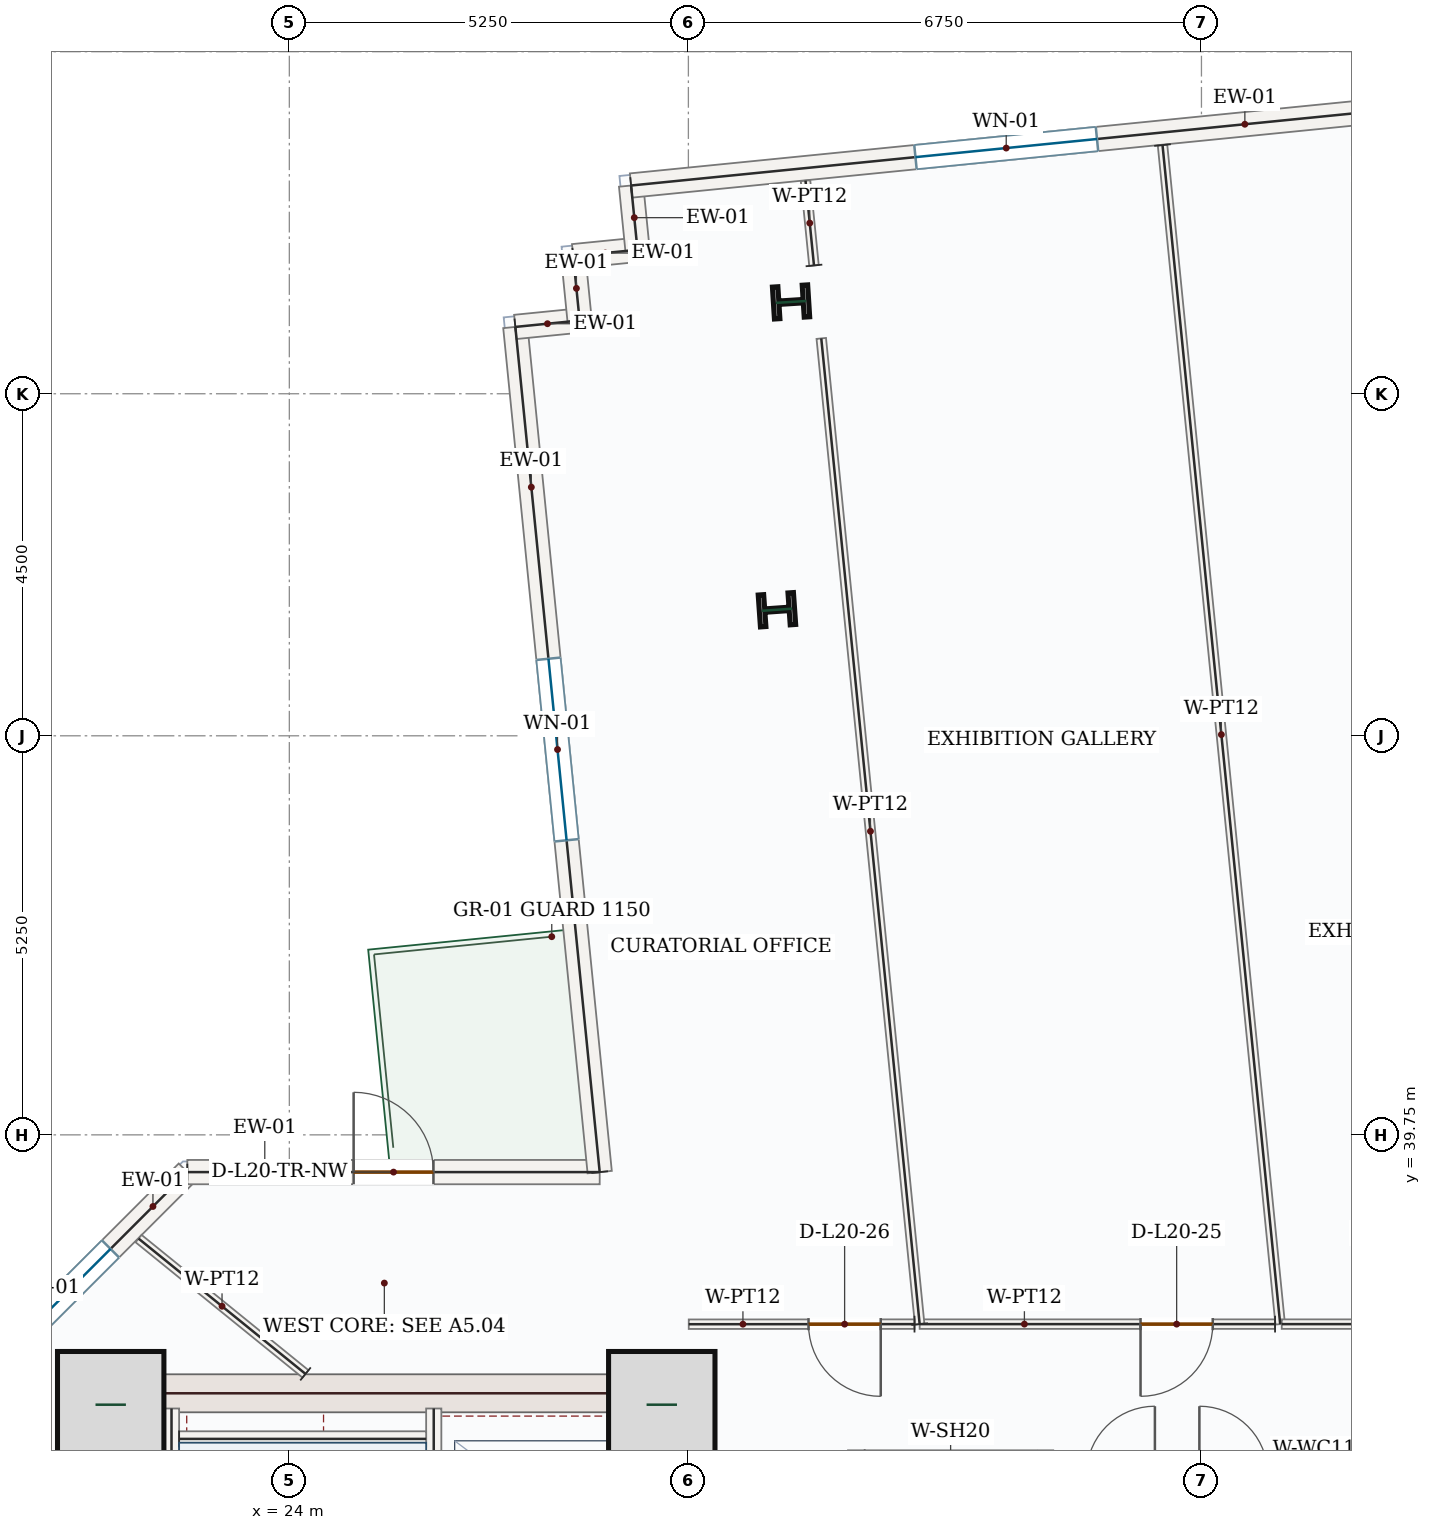
"""IFC4 building model, lengths in metres.
Left out: names, types, materials, properties, quantities, classifications, styles, units other than length and angle.
Written with IfcOpenShell. Run it as: python <this file> out.ifc"""

import sys

from ifc_helpers import new_model, si_unit, direction, frame, frame_2d, origin, origin_2d, place, context, subcontext, project, spatial, rectangle, i_section, extrude, source, transform, mapped, element, fill, save


model = new_model("IFC4")
c1 = context("Model", 3, precision=1e-05, world=origin(), true_north=direction((0.0, 1.0)))
c2 = subcontext(c1, "Body", "Model", "MODEL_VIEW")
j1 = project(units=[si_unit("LENGTHUNIT", "METRE"), si_unit("PLANEANGLEUNIT", "RADIAN")], contexts=[c1])
p1 = place(None, origin())
s1 = spatial("IfcSite", under=j1, at=p1, CompositionType="ELEMENT")
p2 = place(p1, origin())
s2 = spatial("IfcBuilding", under=s1, at=p2, CompositionType="ELEMENT")
p3 = place(p2, frame((0.0, 0.0, 92.1)))
s3 = spatial("IfcBuildingStorey", under=s2, at=p3, CompositionType="ELEMENT", Elevation=92.1)
m1 = source(origin(), c2, "Body", "SweptSolid", [
    extrude(rectangle(XDim=8.55, YDim=0.5, at=frame_2d((4.275, 0.0))), origin(), (0.0, 0.0, 1.0), 3.95),
])
p4 = place(p3, frame((21.5, 28.05, 0.0), z_axis=(0.0, 0.0, 1.0), x_axis=(0.0, 1.0, 0.0)))
e1 = element("IfcWall", 1, at=p4, inside=s3, PredefinedType="SHEAR", context=c2, shape_type="MappedRepresentation", body=[
    mapped(m1, transform((0.0, 0.0, 0.0), x_axis=(1.0, 0.0, 0.0), y_axis=(0.0, 1.0, 0.0), z_axis=(0.0, 0.0, 1.0), scale=1.0)),
])
p5 = place(p3, frame((29.0, 28.05, 0.0), z_axis=(0.0, 0.0, 1.0), x_axis=(0.0, 1.0, 0.0)))
e2 = element("IfcWall", 2, at=p5, inside=s3, PredefinedType="SHEAR", context=c2, shape_type="SweptSolid", body=[
    extrude(rectangle(XDim=8.55, YDim=0.5, at=frame_2d((4.275, 0.0))), origin(), (0.0, 0.0, 1.0), 3.95),
])
p6 = place(p5, frame((1.5, 0.0, 0.0)))
e3 = element("IfcOpeningElement", 3, at=p6, cuts=e2, PredefinedType="OPENING", context=c2, shape_type="SweptSolid", body=[
    extrude(rectangle(XDim=1.1, YDim=2.2, at=frame_2d((0.55, 1.1))), frame((0.0, 0.26, 0.0), z_axis=(0.0, -1.0, 0.0), x_axis=(1.0, 0.0, 0.0)), (0.0, 0.0, 1.0), 0.52),
])
m2 = source(origin(), c2, "Body", "SweptSolid", [
    extrude(rectangle(XDim=7.0, YDim=0.5, at=frame_2d((3.5, 0.0))), origin(), (0.0, 0.0, 1.0), 3.95),
])
p7 = place(p3, frame((21.75, 36.35, 0.0), z_axis=(0.0, 0.0, 1.0), x_axis=(1.0, 0.0, 0.0)))
e4 = element("IfcWall", 4, at=p7, inside=s3, PredefinedType="SHEAR", context=c2, shape_type="MappedRepresentation", body=[
    mapped(m2, transform((0.0, 0.0, 0.0), x_axis=(1.0, 0.0, 0.0), y_axis=(0.0, 1.0, 0.0), z_axis=(0.0, 0.0, 1.0), scale=1.0)),
])
m3 = source(origin(), c2, "Body", "SweptSolid", [
    extrude(rectangle(XDim=1.4, YDim=1.4, at=origin_2d()), origin(), (0.0, 0.0, 1.0), 4.2),
])
for number, where, z_axis, x_axis in (
    (5, (21.65, 36.2, 0.0), (0.0, 0.0, 1.0), (1.0, 0.0, 0.0)),
    (6, (28.9, 36.2, 0.0), (0.0, 0.0, 1.0), (1.0, 0.0, 0.0)),
):
    element("IfcColumn", number, at=place(p3, frame(where, z_axis=z_axis, x_axis=x_axis)), inside=s3, PredefinedType="COLUMN", context=c2, shape_type="MappedRepresentation", body=[
        mapped(m3, transform((0.0, 0.0, 0.0), x_axis=(1.0, 0.0, 0.0), y_axis=(0.0, 1.0, 0.0), z_axis=(0.0, 0.0, 1.0), scale=1.0)),
    ])
m4 = source(origin(), c2, "Body", "SweptSolid", [
    extrude(i_section(OverallWidth=0.421, OverallDepth=0.465, WebThickness=0.045, FlangeThickness=0.073, FilletRadius=0.018, at=origin_2d()), origin(), (0.0, 0.0, 1.0), 4.2),
])
for number, where, z_axis, x_axis in (
    (7, (30.415, 46.658, 0.0), (0.0, 0.0, 1.0), (-0.07, 0.998, 0.0)),
    (8, (30.601, 50.708, 0.0), (0.0, 0.0, 1.0), (-0.063, 0.998, 0.0)),
):
    element("IfcColumn", number, at=place(p3, frame(where, z_axis=z_axis, x_axis=x_axis)), inside=s3, PredefinedType="COLUMN", context=c2, shape_type="MappedRepresentation", body=[
        mapped(m4, transform((0.0, 0.0, 0.0), x_axis=(1.0, 0.0, 0.0), y_axis=(0.0, 1.0, 0.0), z_axis=(0.0, 0.0, 1.0), scale=1.0)),
    ])
p8 = place(p3, frame((18.94, 35.542, 0.0), z_axis=(0.0, 0.0, 1.0), x_axis=(0.707106781187, 0.707106781187, 0.0)))
e9 = element("IfcWall", 9, at=p8, inside=s3, PredefinedType="SOLIDWALL", context=c2, shape_type="SweptSolid", body=[
    extrude(rectangle(XDim=5.258, YDim=0.32, at=frame_2d((2.629, 0.0))), origin(), (0.0, 0.0, 1.0), 3.95),
])
p9 = place(p8, frame((1.429, 0.0, 0.85)))
e10 = element("IfcOpeningElement", 10, at=p9, cuts=e9, PredefinedType="OPENING", context=c2, shape_type="SweptSolid", body=[
    extrude(rectangle(XDim=2.4, YDim=1.8, at=frame_2d((1.2, 0.9))), frame((0.0, 0.17, 0.0), z_axis=(0.0, -1.0, 0.0), x_axis=(1.0, 0.0, 0.0)), (0.0, 0.0, 1.0), 0.34),
])
p10 = place(p3, frame((22.658, 39.26, 0.0), z_axis=(0.0, 0.0, 1.0), x_axis=(1.0, 0.0, 0.0)))
e11 = element("IfcWall", 11, at=p10, inside=s3, PredefinedType="SOLIDWALL", context=c2, shape_type="SweptSolid", body=[
    extrude(rectangle(XDim=5.425, YDim=0.32, at=frame_2d((2.713, 0.0))), origin(), (0.0, 0.0, 1.0), 3.95),
])
p11 = place(p10, frame((2.188, 0.0, 0.0)))
e12 = element("IfcOpeningElement", 12, at=p11, cuts=e11, PredefinedType="OPENING", context=c2, shape_type="SweptSolid", body=[
    extrude(rectangle(XDim=1.05, YDim=2.15, at=frame_2d((0.525, 1.075))), frame((0.0, 0.17, 0.0), z_axis=(0.0, -1.0, 0.0), x_axis=(1.0, 0.0, 0.0)), (0.0, 0.0, 1.0), 0.34),
])
p12 = place(p3, frame((28.083, 39.26, 0.0), z_axis=(0.0, 0.0, 1.0), x_axis=(-0.099322009391, 0.995055344416, 0.0)))
e13 = element("IfcWall", 13, at=p12, inside=s3, PredefinedType="SOLIDWALL", context=c2, shape_type="SweptSolid", body=[
    extrude(rectangle(XDim=11.174, YDim=0.32, at=frame_2d((5.587, 0.0))), origin(), (0.0, 0.0, 1.0), 3.95),
])
p13 = place(p12, frame((4.387, 0.0, 0.85)))
e14 = element("IfcOpeningElement", 14, at=p13, cuts=e13, PredefinedType="OPENING", context=c2, shape_type="SweptSolid", body=[
    extrude(rectangle(XDim=2.4, YDim=1.8, at=frame_2d((1.2, 0.9))), frame((0.0, 0.17, 0.0), z_axis=(0.0, -1.0, 0.0), x_axis=(1.0, 0.0, 0.0)), (0.0, 0.0, 1.0), 0.34),
])
m5 = source(origin(), c2, "Body", "SweptSolid", [
    extrude(rectangle(XDim=0.85, YDim=0.32, at=frame_2d((0.425, 0.0))), origin(), (0.0, 0.0, 1.0), 3.95),
])
p14 = place(p3, frame((26.973, 50.379, 0.0), z_axis=(0.0, 0.0, 1.0), x_axis=(0.995076929088, 0.099105525559, 0.0)))
e15 = element("IfcWall", 15, at=p14, inside=s3, PredefinedType="SOLIDWALL", context=c2, shape_type="MappedRepresentation", body=[
    mapped(m5, transform((0.0, 0.0, 0.0), x_axis=(1.0, 0.0, 0.0), y_axis=(0.0, 1.0, 0.0), z_axis=(0.0, 0.0, 1.0), scale=1.0)),
])
m6 = source(origin(), c2, "Body", "SweptSolid", [
    extrude(rectangle(XDim=0.85, YDim=0.32, at=frame_2d((0.425, 0.0))), origin(), (0.0, 0.0, 1.0), 3.95),
])
for number, where, z_axis, x_axis in (
    (16, (27.819, 50.463, 0.0), (0.0, 0.0, 1.0), (-0.099, 0.995, 0.0)),
    (17, (27.735, 51.309, 0.0), (0.0, 0.0, 1.0), (0.995, 0.099, 0.0)),
):
    element("IfcWall", number, at=place(p3, frame(where, z_axis=z_axis, x_axis=x_axis)), inside=s3, PredefinedType="SOLIDWALL", context=c2, shape_type="MappedRepresentation", body=[
        mapped(m6, transform((0.0, 0.0, 0.0), x_axis=(1.0, 0.0, 0.0), y_axis=(0.0, 1.0, 0.0), z_axis=(0.0, 0.0, 1.0), scale=1.0)),
    ])
p15 = place(p3, frame((28.581, 51.394, 0.0), z_axis=(0.0, 0.0, 1.0), x_axis=(-0.09938995433, 0.995048560111, 0.0)))
e18 = element("IfcWall", 18, at=p15, inside=s3, PredefinedType="SOLIDWALL", context=c2, shape_type="MappedRepresentation", body=[
    mapped(m5, transform((0.0, 0.0, 0.0), x_axis=(1.0, 0.0, 0.0), y_axis=(0.0, 1.0, 0.0), z_axis=(0.0, 0.0, 1.0), scale=1.0)),
])
p16 = place(p3, frame((28.496, 52.24, 0.0), z_axis=(0.0, 0.0, 1.0), x_axis=(0.995054718915, 0.09932827576, 0.0)))
e19 = element("IfcWall", 19, at=p16, inside=s3, PredefinedType="SOLIDWALL", context=c2, shape_type="SweptSolid", body=[
    extrude(rectangle(XDim=9.92, YDim=0.32, at=frame_2d((4.96, 0.0))), origin(), (0.0, 0.0, 1.0), 3.95),
])
p17 = place(p16, frame((3.76, 0.0, 0.85)))
e20 = element("IfcOpeningElement", 20, at=p17, cuts=e19, PredefinedType="OPENING", context=c2, shape_type="SweptSolid", body=[
    extrude(rectangle(XDim=2.4, YDim=1.8, at=frame_2d((1.2, 0.9))), frame((0.0, 0.17, 0.0), z_axis=(0.0, -1.0, 0.0), x_axis=(1.0, 0.0, 0.0)), (0.0, 0.0, 1.0), 0.34),
])
m7 = source(origin(), c2, "Body", "SweptSolid", [
    extrude(rectangle(XDim=7.87, YDim=0.2, at=frame_2d((3.935, 0.0))), origin(), (0.0, 0.0, 1.0), 3.95),
])
p18 = place(p3, frame((22.45, 28.28, 0.0), z_axis=(0.0, 0.0, 1.0), x_axis=(0.0, 1.0, 0.0)))
e21 = element("IfcWall", 21, at=p18, inside=s3, PredefinedType="SOLIDWALL", context=c2, shape_type="MappedRepresentation", body=[
    mapped(m7, transform((0.0, 0.0, 0.0), x_axis=(1.0, 0.0, 0.0), y_axis=(0.0, 1.0, 0.0), z_axis=(0.0, 0.0, 1.0), scale=1.0)),
])
p19 = place(p3, frame((25.9, 28.15, 0.0), z_axis=(0.0, 0.0, 1.0), x_axis=(0.0, 1.0, 0.0)))
e22 = element("IfcWall", 22, at=p19, inside=s3, PredefinedType="SOLIDWALL", context=c2, shape_type="SweptSolid", body=[
    extrude(rectangle(XDim=8.0, YDim=0.2, at=frame_2d((4.0, 0.0))), origin(), (0.0, 0.0, 1.0), 3.95),
])
p20 = place(p19, frame((0.4, 0.0, 0.0)))
e23 = element("IfcOpeningElement", 23, at=p20, cuts=e22, PredefinedType="OPENING", context=c2, shape_type="SweptSolid", body=[
    extrude(rectangle(XDim=1.05, YDim=2.15, at=frame_2d((0.525, 1.075))), frame((0.0, 0.11, 0.0), z_axis=(0.0, -1.0, 0.0), x_axis=(1.0, 0.0, 0.0)), (0.0, 0.0, 1.0), 0.22),
])
m8 = source(origin(), c2, "Body", "SweptSolid", [
    extrude(rectangle(XDim=3.25, YDim=0.2, at=frame_2d((1.625, 0.0))), origin(), (0.0, 0.0, 1.0), 3.95),
])
p21 = place(p3, frame((22.55, 35.75, 0.0), z_axis=(0.0, 0.0, 1.0), x_axis=(1.0, 0.0, 0.0)))
e24 = element("IfcWall", 24, at=p21, inside=s3, PredefinedType="SOLIDWALL", context=c2, shape_type="MappedRepresentation", body=[
    mapped(m8, transform((0.0, 0.0, 0.0), x_axis=(1.0, 0.0, 0.0), y_axis=(0.0, 1.0, 0.0), z_axis=(0.0, 0.0, 1.0), scale=1.0)),
])
m9 = source(origin(), c2, "Body", "SweptSolid", [
    extrude(rectangle(XDim=2.4, YDim=0.2, at=frame_2d((1.2, 0.0))), origin(), (0.0, 0.0, 1.0), 3.95),
])
for number, where, z_axis, x_axis in (
    (25, (31.45, 33.2, 0.0), (0.0, 0.0, 1.0), (0.0, 1.0, 0.0)),
    (26, (33.95, 33.2, 0.0), (0.0, 0.0, 1.0), (0.0, 1.0, 0.0)),
    (27, (38.05, 33.2, 0.0), (0.0, 0.0, 1.0), (0.0, 1.0, 0.0)),
):
    element("IfcWall", number, at=place(p3, frame(where, z_axis=z_axis, x_axis=x_axis)), inside=s3, PredefinedType="SOLIDWALL", context=c2, shape_type="MappedRepresentation", body=[
        mapped(m9, transform((0.0, 0.0, 0.0), x_axis=(1.0, 0.0, 0.0), y_axis=(0.0, 1.0, 0.0), z_axis=(0.0, 0.0, 1.0), scale=1.0)),
    ])
m10 = source(origin(), c2, "Body", "SweptSolid", [
    extrude(rectangle(XDim=15.589, YDim=0.125, at=frame_2d((7.794, 0.0))), origin(), (0.0, 0.0, 1.0), 3.95),
])
p22 = place(p3, frame((35.488, 52.771, 0.0), z_axis=(0.0, 0.0, 1.0), x_axis=(0.099325393126, -0.995055006661, 0.0)))
e28 = element("IfcWall", 28, at=p22, inside=s3, PredefinedType="PARTITIONING", context=c2, shape_type="MappedRepresentation", body=[
    mapped(m10, transform((0.0, 0.0, 0.0), x_axis=(1.0, 0.0, 0.0), y_axis=(0.0, 1.0, 0.0), z_axis=(0.0, 0.0, 1.0), scale=1.0)),
])
p23 = place(p3, frame((36.968, 37.26, 0.0), z_axis=(0.0, 0.0, 1.0), x_axis=(-1.0, 0.0, 0.0)))
e29 = element("IfcWall", 29, at=p23, inside=s3, PredefinedType="PARTITIONING", context=c2, shape_type="SweptSolid", body=[
    extrude(rectangle(XDim=4.676, YDim=0.125, at=frame_2d((2.338, 0.0))), origin(), (0.0, 0.0, 1.0), 3.95),
])
p24 = place(p23, frame((0.82, 0.0, 0.0)))
e30 = element("IfcOpeningElement", 30, at=p24, cuts=e29, PredefinedType="OPENING", context=c2, shape_type="SweptSolid", body=[
    extrude(rectangle(XDim=0.95, YDim=2.15, at=frame_2d((0.475, 1.075))), frame((0.0, 0.073, 0.0), z_axis=(0.0, -1.0, 0.0), x_axis=(1.0, 0.0, 0.0)), (0.0, 0.0, 1.0), 0.145),
])
m11 = source(origin(), c2, "Body", "SweptSolid", [
    extrude(rectangle(XDim=13.032, YDim=0.125, at=frame_2d((6.516, 0.0))), origin(), (0.0, 0.0, 1.0), 3.95),
])
p25 = place(p3, frame((32.293, 37.26, 0.0), z_axis=(0.0, 0.0, 1.0), x_axis=(-0.099325655293, 0.995054980491, 0.0)))
e31 = element("IfcWall", 31, at=p25, inside=s3, PredefinedType="PARTITIONING", context=c2, shape_type="MappedRepresentation", body=[
    mapped(m11, transform((0.0, 0.0, 0.0), x_axis=(1.0, 0.0, 0.0), y_axis=(0.0, 1.0, 0.0), z_axis=(0.0, 0.0, 1.0), scale=1.0)),
])
m12 = source(origin(), c2, "Body", "SweptSolid", [
    extrude(rectangle(XDim=1.121, YDim=0.125, at=frame_2d((0.56, 0.0))), origin(), (0.0, 0.0, 1.0), 3.95),
])
p26 = place(p3, frame((30.902, 51.188, 0.0), z_axis=(0.0, 0.0, 1.0), x_axis=(-0.099352712797, 0.99505227926, 0.0)))
e32 = element("IfcWall", 32, at=p26, inside=s3, PredefinedType="PARTITIONING", context=c2, shape_type="MappedRepresentation", body=[
    mapped(m12, transform((0.0, 0.0, 0.0), x_axis=(1.0, 0.0, 0.0), y_axis=(0.0, 1.0, 0.0), z_axis=(0.0, 0.0, 1.0), scale=1.0)),
])
p27 = place(p3, frame((32.225, 37.26, 0.0), z_axis=(0.0, 0.0, 1.0), x_axis=(-0.999999915533, -0.000411015173, 0.0)))
e33 = element("IfcWall", 33, at=p27, inside=s3, PredefinedType="PARTITIONING", context=c2, shape_type="SweptSolid", body=[
    extrude(rectangle(XDim=2.97, YDim=0.125, at=frame_2d((1.485, 0.0))), origin(), (0.0, 0.0, 1.0), 3.95),
])
p28 = place(p27, frame((0.444, 0.0, 0.0)))
e34 = element("IfcOpeningElement", 34, at=p28, cuts=e33, PredefinedType="OPENING", context=c2, shape_type="SweptSolid", body=[
    extrude(rectangle(XDim=0.95, YDim=2.15, at=frame_2d((0.475, 1.075))), frame((0.0, 0.073, 0.0), z_axis=(0.0, -1.0, 0.0), x_axis=(1.0, 0.0, 0.0)), (0.0, 0.0, 1.0), 0.145),
])
m13 = source(origin(), c2, "Body", "SweptSolid", [
    extrude(rectangle(XDim=2.827, YDim=0.125, at=frame_2d((1.414, 0.0))), origin(), (0.0, 0.0, 1.0), 3.95),
])
p29 = place(p3, frame((24.213, 36.605, 0.0), z_axis=(0.0, 0.0, 1.0), x_axis=(-0.776808269954, 0.62973717671, 0.0)))
e35 = element("IfcWall", 35, at=p29, inside=s3, PredefinedType="PARTITIONING", context=c2, shape_type="MappedRepresentation", body=[
    mapped(m13, transform((0.0, 0.0, 0.0), x_axis=(1.0, 0.0, 0.0), y_axis=(0.0, 1.0, 0.0), z_axis=(0.0, 0.0, 1.0), scale=1.0)),
])
p30 = place(p3, frame((42.742, 37.26, 0.0), z_axis=(0.0, 0.0, 1.0), x_axis=(-0.999999999078, 4.2935039e-05, 0.0)))
e36 = element("IfcWall", 36, at=p30, inside=s3, PredefinedType="PARTITIONING", context=c2, shape_type="SweptSolid", body=[
    extrude(rectangle(XDim=5.686, YDim=0.125, at=frame_2d((2.843, 0.0))), origin(), (0.0, 0.0, 1.0), 3.95),
])
p31 = place(p30, frame((3.694, 0.0, 0.0)))
e37 = element("IfcOpeningElement", 37, at=p31, cuts=e36, PredefinedType="OPENING", context=c2, shape_type="SweptSolid", body=[
    extrude(rectangle(XDim=0.95, YDim=2.15, at=frame_2d((0.475, 1.075))), frame((0.0, 0.073, 0.0), z_axis=(0.0, -1.0, 0.0), x_axis=(1.0, 0.0, 0.0)), (0.0, 0.0, 1.0), 0.145),
])
m14 = source(origin(), c2, "Body", "SweptSolid", [
    extrude(rectangle(XDim=2.4, YDim=1.8, at=frame_2d((1.2, 0.9))), frame((0.0, 0.03, 0.0), z_axis=(0.0, -1.0, 0.0), x_axis=(1.0, 0.0, 0.0)), (0.0, 0.0, 1.0), 0.06),
])
p32 = place(p9, origin())
e38 = element("IfcWindow", 38, at=p32, inside=s3, PartitioningType="DOUBLE_PANEL_VERTICAL", PredefinedType="WINDOW", context=c2, shape_type="MappedRepresentation", body=[
    mapped(m14, transform((0.0, 0.0, 0.0), x_axis=(1.0, 0.0, 0.0), y_axis=(0.0, 1.0, 0.0), z_axis=(0.0, 0.0, 1.0), scale=1.0)),
])
fill(e10, e38)
m15 = source(origin(), c2, "Body", "SweptSolid", [
    extrude(rectangle(XDim=1.05, YDim=2.15, at=frame_2d((0.525, 1.075))), frame((0.0, 0.025, 0.0), z_axis=(0.0, -1.0, 0.0), x_axis=(1.0, 0.0, 0.0)), (0.0, 0.0, 1.0), 0.05),
])
p33 = place(p11, origin())
e39 = element("IfcDoor", 39, at=p33, inside=s3, OperationType="SINGLE_SWING_LEFT", PredefinedType="DOOR", context=c2, shape_type="MappedRepresentation", body=[
    mapped(m15, transform((0.0, 0.0, 0.0), x_axis=(1.0, 0.0, 0.0), y_axis=(0.0, 1.0, 0.0), z_axis=(0.0, 0.0, 1.0), scale=1.0)),
])
fill(e12, e39)
p34 = place(p13, origin())
e40 = element("IfcWindow", 40, at=p34, inside=s3, PartitioningType="DOUBLE_PANEL_VERTICAL", PredefinedType="WINDOW", context=c2, shape_type="MappedRepresentation", body=[
    mapped(m14, transform((0.0, 0.0, 0.0), x_axis=(1.0, 0.0, 0.0), y_axis=(0.0, 1.0, 0.0), z_axis=(0.0, 0.0, 1.0), scale=1.0)),
])
fill(e14, e40)
p35 = place(p17, origin())
e41 = element("IfcWindow", 41, at=p35, inside=s3, PartitioningType="DOUBLE_PANEL_VERTICAL", PredefinedType="WINDOW", context=c2, shape_type="MappedRepresentation", body=[
    mapped(m14, transform((0.0, 0.0, 0.0), x_axis=(1.0, 0.0, 0.0), y_axis=(0.0, 1.0, 0.0), z_axis=(0.0, 0.0, 1.0), scale=1.0)),
])
fill(e20, e41)
m16 = source(origin(), c2, "Body", "SweptSolid", [
    extrude(rectangle(XDim=0.95, YDim=2.15, at=frame_2d((0.475, 1.075))), frame((0.0, 0.025, 0.0), z_axis=(0.0, -1.0, 0.0), x_axis=(1.0, 0.0, 0.0)), (0.0, 0.0, 1.0), 0.05),
])
p36 = place(p24, origin())
e42 = element("IfcDoor", 42, at=p36, inside=s3, OperationType="SINGLE_SWING_RIGHT", PredefinedType="DOOR", context=c2, shape_type="MappedRepresentation", body=[
    mapped(m16, transform((0.0, 0.0, 0.0), x_axis=(1.0, 0.0, 0.0), y_axis=(0.0, 1.0, 0.0), z_axis=(0.0, 0.0, 1.0), scale=1.0)),
])
fill(e30, e42)
p37 = place(p28, origin())
e43 = element("IfcDoor", 43, at=p37, inside=s3, OperationType="SINGLE_SWING_LEFT", PredefinedType="DOOR", context=c2, shape_type="MappedRepresentation", body=[
    mapped(m16, transform((0.0, 0.0, 0.0), x_axis=(1.0, 0.0, 0.0), y_axis=(0.0, 1.0, 0.0), z_axis=(0.0, 0.0, 1.0), scale=1.0)),
])
fill(e34, e43)
save(model, sys.argv[1])
